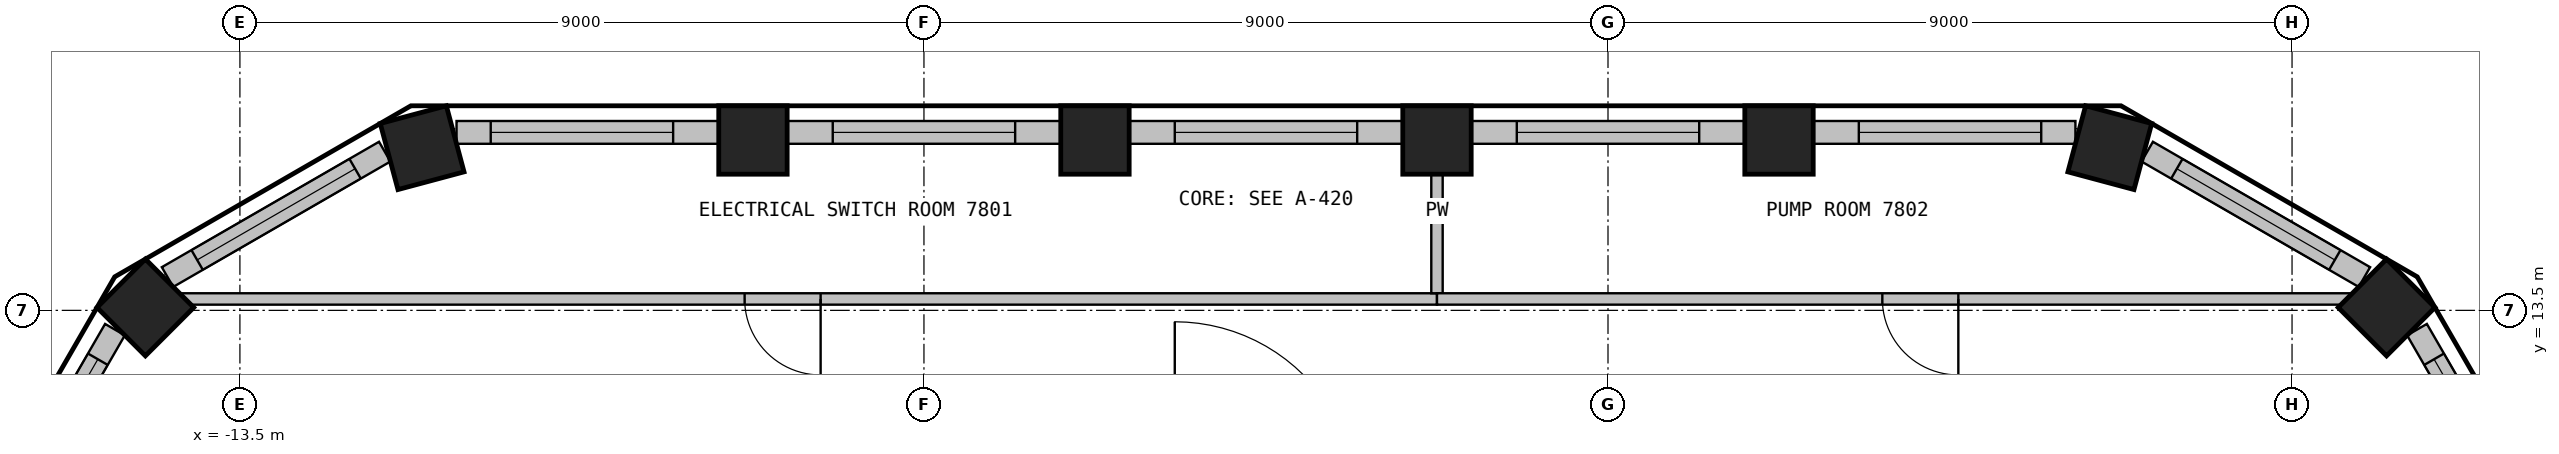
"""IFC4 building model, lengths in metres.
Left out: names, types, materials, properties, quantities, classifications, styles, units other than length and angle.
Written with IfcOpenShell. Run it as: python <this file> out.ifc"""

import sys

from ifc_helpers import new_model, si_unit, direction, frame, frame_2d, origin, origin_2d, place, context, subcontext, project, spatial, rectangle, extrude, element, fill, save


model = new_model("IFC4")
c1 = context("Model", 3, precision=1e-05, world=origin(), true_north=direction((0.0, 1.0)))
c2 = subcontext(c1, "Body", "Model", "MODEL_VIEW")
j1 = project(units=[si_unit("LENGTHUNIT", "METRE"), si_unit("PLANEANGLEUNIT", "RADIAN")], contexts=[c1])
p1 = place(None, origin())
s1 = spatial("IfcSite", under=j1, at=p1, CompositionType="ELEMENT")
p2 = place(p1, origin())
s2 = spatial("IfcBuilding", under=s1, at=p2, CompositionType="ELEMENT")
p3 = place(p2, frame((0.0, 0.0, 318.9)))
s3 = spatial("IfcBuildingStorey", under=s2, at=p3, CompositionType="ELEMENT", Elevation=318.9)
for number, where, z_axis, x_axis in (
    (1, (14.744, 13.538, 0.0), (0.0, 0.0, 1.0), (-0.707, 0.707, 0.0)),
    (2, (11.102, 15.64, 0.0), (0.0, 0.0, 1.0), (-0.966, 0.259, 0.0)),
    (3, (6.75, 15.741, 0.0), (0.0, 0.0, 1.0), (-1.0, 0.0, 0.0)),
    (4, (2.25, 15.741, 0.0), (0.0, 0.0, 1.0), (-1.0, 0.0, 0.0)),
    (5, (-2.25, 15.741, 0.0), (0.0, 0.0, 1.0), (-1.0, 0.0, 0.0)),
    (6, (-6.75, 15.741, 0.0), (0.0, 0.0, 1.0), (-1.0, 0.0, 0.0)),
    (7, (-11.102, 15.64, 0.0), (0.0, 0.0, 1.0), (-0.966, -0.259, 0.0)),
    (8, (-14.744, 13.538, 0.0), (0.0, 0.0, 1.0), (-0.707, -0.707, 0.0)),
):
    element("IfcColumn", number, at=place(p3, frame(where, z_axis=z_axis, x_axis=x_axis)), inside=s3, PredefinedType="COLUMN", context=c2, shape_type="SweptSolid", body=[
        extrude(rectangle(XDim=0.9, YDim=0.9, at=origin_2d()), origin(), (0.0, 0.0, 1.0), 3.6),
    ])
p4 = place(p3, frame((16.869, 10.26, 0.0), z_axis=(0.0, 0.0, 1.0), x_axis=(-0.500059425018, 0.865991092016, 0.0)))
e9 = element("IfcWall", 9, at=p4, inside=s3, PredefinedType="SOLIDWALL", context=c2, shape_type="SweptSolid", body=[
    extrude(rectangle(XDim=3.449, YDim=0.3, at=frame_2d((1.725, 0.0))), origin(), (0.0, 0.0, 1.0), 4.05),
])
p5 = place(p4, frame((0.6, 0.0, 0.6)))
e10 = element("IfcOpeningElement", 10, at=p5, cuts=e9, PredefinedType="OPENING", context=c2, shape_type="SweptSolid", body=[
    extrude(rectangle(XDim=2.4, YDim=2.3, at=frame_2d((1.2, 1.15))), frame((0.0, 0.16, 0.0), z_axis=(0.0, -1.0, 0.0), x_axis=(1.0, 0.0, 0.0)), (0.0, 0.0, 1.0), 0.32),
])
p6 = place(p3, frame((14.452, 13.938, 0.0), z_axis=(0.0, 0.0, 1.0), x_axis=(-0.866021716278, 0.500006386895, 0.0)))
e11 = element("IfcWall", 11, at=p6, inside=s3, PredefinedType="SOLIDWALL", context=c2, shape_type="SweptSolid", body=[
    extrude(rectangle(XDim=3.3, YDim=0.3, at=frame_2d((1.65, 0.0))), origin(), (0.0, 0.0, 1.0), 4.05),
])
p7 = place(p6, frame((0.45, 0.0, 0.6)))
e12 = element("IfcOpeningElement", 12, at=p7, cuts=e11, PredefinedType="OPENING", context=c2, shape_type="SweptSolid", body=[
    extrude(rectangle(XDim=2.4, YDim=2.3, at=frame_2d((1.2, 1.15))), frame((0.0, 0.16, 0.0), z_axis=(0.0, -1.0, 0.0), x_axis=(1.0, 0.0, 0.0)), (0.0, 0.0, 1.0), 0.32),
])
p8 = place(p3, frame((10.65, 15.841, 0.0), z_axis=(0.0, 0.0, 1.0), x_axis=(-1.0, 0.0, 0.0)))
e13 = element("IfcWall", 13, at=p8, inside=s3, PredefinedType="SOLIDWALL", context=c2, shape_type="SweptSolid", body=[
    extrude(rectangle(XDim=3.449, YDim=0.3, at=frame_2d((1.725, 0.0))), origin(), (0.0, 0.0, 1.0), 4.05),
])
p9 = place(p8, frame((0.45, 0.0, 0.6)))
e14 = element("IfcOpeningElement", 14, at=p9, cuts=e13, PredefinedType="OPENING", context=c2, shape_type="SweptSolid", body=[
    extrude(rectangle(XDim=2.4, YDim=2.3, at=frame_2d((1.2, 1.15))), frame((0.0, 0.16, 0.0), z_axis=(0.0, -1.0, 0.0), x_axis=(1.0, 0.0, 0.0)), (0.0, 0.0, 1.0), 0.32),
])
p10 = place(p3, frame((6.3, 15.841, 0.0), z_axis=(0.0, 0.0, 1.0), x_axis=(-1.0, 0.0, 0.0)))
e15 = element("IfcWall", 15, at=p10, inside=s3, PredefinedType="SOLIDWALL", context=c2, shape_type="SweptSolid", body=[
    extrude(rectangle(XDim=3.599, YDim=0.3, at=frame_2d((1.8, 0.0))), origin(), (0.0, 0.0, 1.0), 4.05),
])
p11 = place(p10, frame((0.6, 0.0, 0.6)))
e16 = element("IfcOpeningElement", 16, at=p11, cuts=e15, PredefinedType="OPENING", context=c2, shape_type="SweptSolid", body=[
    extrude(rectangle(XDim=2.4, YDim=2.3, at=frame_2d((1.2, 1.15))), frame((0.0, 0.16, 0.0), z_axis=(0.0, -1.0, 0.0), x_axis=(1.0, 0.0, 0.0)), (0.0, 0.0, 1.0), 0.32),
])
p12 = place(p3, frame((1.8, 15.841, 0.0), z_axis=(0.0, 0.0, 1.0), x_axis=(-1.0, 0.0, 0.0)))
e17 = element("IfcWall", 17, at=p12, inside=s3, PredefinedType="SOLIDWALL", context=c2, shape_type="SweptSolid", body=[
    extrude(rectangle(XDim=3.599, YDim=0.3, at=frame_2d((1.8, 0.0))), origin(), (0.0, 0.0, 1.0), 4.05),
])
p13 = place(p12, frame((0.6, 0.0, 0.6)))
e18 = element("IfcOpeningElement", 18, at=p13, cuts=e17, PredefinedType="OPENING", context=c2, shape_type="SweptSolid", body=[
    extrude(rectangle(XDim=2.4, YDim=2.3, at=frame_2d((1.2, 1.15))), frame((0.0, 0.16, 0.0), z_axis=(0.0, -1.0, 0.0), x_axis=(1.0, 0.0, 0.0)), (0.0, 0.0, 1.0), 0.32),
])
p14 = place(p3, frame((-2.7, 15.841, 0.0), z_axis=(0.0, 0.0, 1.0), x_axis=(-1.0, 0.0, 0.0)))
e19 = element("IfcWall", 19, at=p14, inside=s3, PredefinedType="SOLIDWALL", context=c2, shape_type="SweptSolid", body=[
    extrude(rectangle(XDim=3.599, YDim=0.3, at=frame_2d((1.8, 0.0))), origin(), (0.0, 0.0, 1.0), 4.05),
])
p15 = place(p14, frame((0.6, 0.0, 0.6)))
e20 = element("IfcOpeningElement", 20, at=p15, cuts=e19, PredefinedType="OPENING", context=c2, shape_type="SweptSolid", body=[
    extrude(rectangle(XDim=2.4, YDim=2.3, at=frame_2d((1.2, 1.15))), frame((0.0, 0.16, 0.0), z_axis=(0.0, -1.0, 0.0), x_axis=(1.0, 0.0, 0.0)), (0.0, 0.0, 1.0), 0.32),
])
p16 = place(p3, frame((-7.2, 15.841, 0.0), z_axis=(0.0, 0.0, 1.0), x_axis=(-1.0, 0.0, 0.0)))
e21 = element("IfcWall", 21, at=p16, inside=s3, PredefinedType="SOLIDWALL", context=c2, shape_type="SweptSolid", body=[
    extrude(rectangle(XDim=3.449, YDim=0.3, at=frame_2d((1.725, 0.0))), origin(), (0.0, 0.0, 1.0), 4.05),
])
p17 = place(p16, frame((0.6, 0.0, 0.6)))
e22 = element("IfcOpeningElement", 22, at=p17, cuts=e21, PredefinedType="OPENING", context=c2, shape_type="SweptSolid", body=[
    extrude(rectangle(XDim=2.4, YDim=2.3, at=frame_2d((1.2, 1.15))), frame((0.0, 0.16, 0.0), z_axis=(0.0, -1.0, 0.0), x_axis=(1.0, 0.0, 0.0)), (0.0, 0.0, 1.0), 0.32),
])
p18 = place(p3, frame((-11.595, 15.588, 0.0), z_axis=(0.0, 0.0, 1.0), x_axis=(-0.866021716278, -0.500006386895, 0.0)))
e23 = element("IfcWall", 23, at=p18, inside=s3, PredefinedType="SOLIDWALL", context=c2, shape_type="SweptSolid", body=[
    extrude(rectangle(XDim=3.3, YDim=0.3, at=frame_2d((1.65, 0.0))), origin(), (0.0, 0.0, 1.0), 4.05),
])
p19 = place(p18, frame((0.45, 0.0, 0.6)))
e24 = element("IfcOpeningElement", 24, at=p19, cuts=e23, PredefinedType="OPENING", context=c2, shape_type="SweptSolid", body=[
    extrude(rectangle(XDim=2.4, YDim=2.3, at=frame_2d((1.2, 1.15))), frame((0.0, 0.16, 0.0), z_axis=(0.0, -1.0, 0.0), x_axis=(1.0, 0.0, 0.0)), (0.0, 0.0, 1.0), 0.32),
])
p20 = place(p3, frame((-15.144, 13.247, 0.0), z_axis=(0.0, 0.0, 1.0), x_axis=(-0.500059425018, -0.865991092016, 0.0)))
e25 = element("IfcWall", 25, at=p20, inside=s3, PredefinedType="SOLIDWALL", context=c2, shape_type="SweptSolid", body=[
    extrude(rectangle(XDim=3.449, YDim=0.3, at=frame_2d((1.725, 0.0))), origin(), (0.0, 0.0, 1.0), 4.05),
])
p21 = place(p20, frame((0.45, 0.0, 0.6)))
e26 = element("IfcOpeningElement", 26, at=p21, cuts=e25, PredefinedType="OPENING", context=c2, shape_type="SweptSolid", body=[
    extrude(rectangle(XDim=2.4, YDim=2.3, at=frame_2d((1.2, 1.15))), frame((0.0, 0.16, 0.0), z_axis=(0.0, -1.0, 0.0), x_axis=(1.0, 0.0, 0.0)), (0.0, 0.0, 1.0), 0.32),
])
p22 = place(p3, frame((2.25, 13.65, 0.0), z_axis=(0.0, 0.0, 1.0), x_axis=(-1.0, 0.0, 0.0)))
e27 = element("IfcWall", 27, at=p22, inside=s3, PredefinedType="PARTITIONING", context=c2, shape_type="SweptSolid", body=[
    extrude(rectangle(XDim=17.219, YDim=0.15, at=frame_2d((8.609, 0.0))), origin(), (0.0, 0.0, 1.0), 3.6),
])
p23 = place(p22, frame((8.11, 0.0, 0.0)))
e28 = element("IfcOpeningElement", 28, at=p23, cuts=e27, PredefinedType="OPENING", context=c2, shape_type="SweptSolid", body=[
    extrude(rectangle(XDim=1.0, YDim=2.1, at=frame_2d((0.5, 1.05))), frame((0.0, 0.085, 0.0), z_axis=(0.0, -1.0, 0.0), x_axis=(1.0, 0.0, 0.0)), (0.0, 0.0, 1.0), 0.17),
])
p24 = place(p3, frame((2.25, 15.891, 0.0), z_axis=(0.0, 0.0, 1.0), x_axis=(0.0, -1.0, 0.0)))
e29 = element("IfcWall", 29, at=p24, inside=s3, PredefinedType="PARTITIONING", context=c2, shape_type="SweptSolid", body=[
    extrude(rectangle(XDim=2.166, YDim=0.15, at=frame_2d((1.083, 0.0))), origin(), (0.0, 0.0, 1.0), 3.6),
])
p25 = place(p3, frame((14.969, 13.65, 0.0), z_axis=(0.0, 0.0, 1.0), x_axis=(-1.0, 0.0, 0.0)))
e30 = element("IfcWall", 30, at=p25, inside=s3, PredefinedType="PARTITIONING", context=c2, shape_type="SweptSolid", body=[
    extrude(rectangle(XDim=12.719, YDim=0.15, at=frame_2d((6.359, 0.0))), origin(), (0.0, 0.0, 1.0), 3.6),
])
p26 = place(p25, frame((5.86, 0.0, 0.0)))
e31 = element("IfcOpeningElement", 31, at=p26, cuts=e30, PredefinedType="OPENING", context=c2, shape_type="SweptSolid", body=[
    extrude(rectangle(XDim=1.0, YDim=2.1, at=frame_2d((0.5, 1.05))), frame((0.0, 0.085, 0.0), z_axis=(0.0, -1.0, 0.0), x_axis=(1.0, 0.0, 0.0)), (0.0, 0.0, 1.0), 0.17),
])
p27 = place(p5, origin())
e32 = element("IfcWindow", 32, at=p27, inside=s3, PartitioningType="SINGLE_PANEL", PredefinedType="WINDOW", context=c2, shape_type="SweptSolid", body=[
    extrude(rectangle(XDim=2.4, YDim=2.3, at=frame_2d((1.2, 1.15))), frame((0.0, 0.03, 0.0), z_axis=(0.0, -1.0, 0.0), x_axis=(1.0, 0.0, 0.0)), (0.0, 0.0, 1.0), 0.06),
])
fill(e10, e32)
p28 = place(p7, origin())
e33 = element("IfcWindow", 33, at=p28, inside=s3, PartitioningType="SINGLE_PANEL", PredefinedType="WINDOW", context=c2, shape_type="SweptSolid", body=[
    extrude(rectangle(XDim=2.4, YDim=2.3, at=frame_2d((1.2, 1.15))), frame((0.0, 0.03, 0.0), z_axis=(0.0, -1.0, 0.0), x_axis=(1.0, 0.0, 0.0)), (0.0, 0.0, 1.0), 0.06),
])
fill(e12, e33)
p29 = place(p9, origin())
e34 = element("IfcWindow", 34, at=p29, inside=s3, PartitioningType="SINGLE_PANEL", PredefinedType="WINDOW", context=c2, shape_type="SweptSolid", body=[
    extrude(rectangle(XDim=2.4, YDim=2.3, at=frame_2d((1.2, 1.15))), frame((0.0, 0.03, 0.0), z_axis=(0.0, -1.0, 0.0), x_axis=(1.0, 0.0, 0.0)), (0.0, 0.0, 1.0), 0.06),
])
fill(e14, e34)
p30 = place(p11, origin())
e35 = element("IfcWindow", 35, at=p30, inside=s3, PartitioningType="SINGLE_PANEL", PredefinedType="WINDOW", context=c2, shape_type="SweptSolid", body=[
    extrude(rectangle(XDim=2.4, YDim=2.3, at=frame_2d((1.2, 1.15))), frame((0.0, 0.03, 0.0), z_axis=(0.0, -1.0, 0.0), x_axis=(1.0, 0.0, 0.0)), (0.0, 0.0, 1.0), 0.06),
])
fill(e16, e35)
p31 = place(p13, origin())
e36 = element("IfcWindow", 36, at=p31, inside=s3, PartitioningType="SINGLE_PANEL", PredefinedType="WINDOW", context=c2, shape_type="SweptSolid", body=[
    extrude(rectangle(XDim=2.4, YDim=2.3, at=frame_2d((1.2, 1.15))), frame((0.0, 0.03, 0.0), z_axis=(0.0, -1.0, 0.0), x_axis=(1.0, 0.0, 0.0)), (0.0, 0.0, 1.0), 0.06),
])
fill(e18, e36)
p32 = place(p15, origin())
e37 = element("IfcWindow", 37, at=p32, inside=s3, PartitioningType="SINGLE_PANEL", PredefinedType="WINDOW", context=c2, shape_type="SweptSolid", body=[
    extrude(rectangle(XDim=2.4, YDim=2.3, at=frame_2d((1.2, 1.15))), frame((0.0, 0.03, 0.0), z_axis=(0.0, -1.0, 0.0), x_axis=(1.0, 0.0, 0.0)), (0.0, 0.0, 1.0), 0.06),
])
fill(e20, e37)
p33 = place(p17, origin())
e38 = element("IfcWindow", 38, at=p33, inside=s3, PartitioningType="SINGLE_PANEL", PredefinedType="WINDOW", context=c2, shape_type="SweptSolid", body=[
    extrude(rectangle(XDim=2.4, YDim=2.3, at=frame_2d((1.2, 1.15))), frame((0.0, 0.03, 0.0), z_axis=(0.0, -1.0, 0.0), x_axis=(1.0, 0.0, 0.0)), (0.0, 0.0, 1.0), 0.06),
])
fill(e22, e38)
p34 = place(p19, origin())
e39 = element("IfcWindow", 39, at=p34, inside=s3, PartitioningType="SINGLE_PANEL", PredefinedType="WINDOW", context=c2, shape_type="SweptSolid", body=[
    extrude(rectangle(XDim=2.4, YDim=2.3, at=frame_2d((1.2, 1.15))), frame((0.0, 0.03, 0.0), z_axis=(0.0, -1.0, 0.0), x_axis=(1.0, 0.0, 0.0)), (0.0, 0.0, 1.0), 0.06),
])
fill(e24, e39)
p35 = place(p21, origin())
e40 = element("IfcWindow", 40, at=p35, inside=s3, PartitioningType="SINGLE_PANEL", PredefinedType="WINDOW", context=c2, shape_type="SweptSolid", body=[
    extrude(rectangle(XDim=2.4, YDim=2.3, at=frame_2d((1.2, 1.15))), frame((0.0, 0.03, 0.0), z_axis=(0.0, -1.0, 0.0), x_axis=(1.0, 0.0, 0.0)), (0.0, 0.0, 1.0), 0.06),
])
fill(e26, e40)
p36 = place(p23, origin())
e41 = element("IfcDoor", 41, at=p36, inside=s3, OperationType="SINGLE_SWING_RIGHT", PredefinedType="DOOR", context=c2, shape_type="SweptSolid", body=[
    extrude(rectangle(XDim=1.0, YDim=2.1, at=frame_2d((0.5, 1.05))), frame((0.0, 0.025, 0.0), z_axis=(0.0, -1.0, 0.0), x_axis=(1.0, 0.0, 0.0)), (0.0, 0.0, 1.0), 0.05),
])
fill(e28, e41)
p37 = place(p26, origin())
e42 = element("IfcDoor", 42, at=p37, inside=s3, OperationType="SINGLE_SWING_RIGHT", PredefinedType="DOOR", context=c2, shape_type="SweptSolid", body=[
    extrude(rectangle(XDim=1.0, YDim=2.1, at=frame_2d((0.5, 1.05))), frame((0.0, 0.025, 0.0), z_axis=(0.0, -1.0, 0.0), x_axis=(1.0, 0.0, 0.0)), (0.0, 0.0, 1.0), 0.05),
])
fill(e31, e42)
save(model, sys.argv[1])
